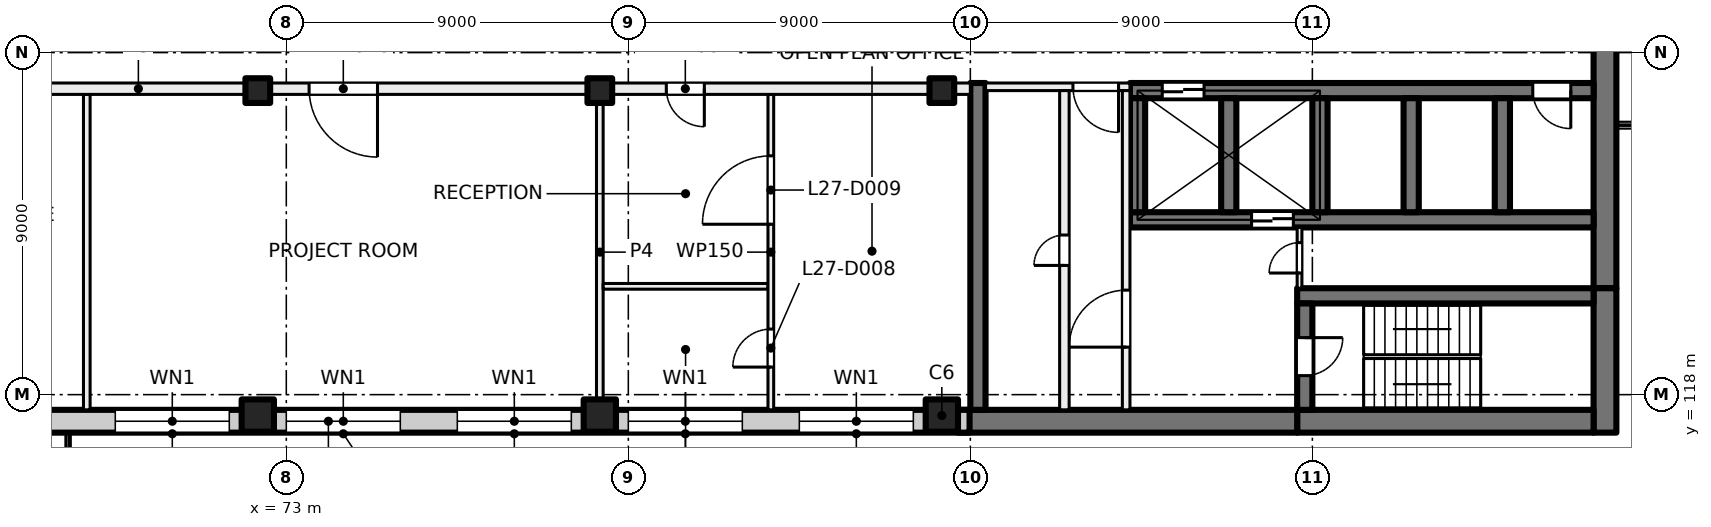
"""IFC4 building model, lengths in metres.
Left out: names, types, materials, properties, quantities, classifications, styles, units other than length and angle.
Written with IfcOpenShell. Run it as: python <this file> out.ifc"""

import sys

from ifc_helpers import new_model, si_unit, direction, frame, frame_2d, origin, origin_2d, place, context, subcontext, project, spatial, rectangle, extrude, element, fill, save


model = new_model("IFC4")
c1 = context("Model", 3, precision=1e-05, world=origin(), true_north=direction((0.0, 1.0)))
c2 = subcontext(c1, "Body", "Model", "MODEL_VIEW")
j1 = project(units=[si_unit("LENGTHUNIT", "METRE"), si_unit("PLANEANGLEUNIT", "RADIAN")], contexts=[c1])
p1 = place(None, origin())
s1 = spatial("IfcSite", under=j1, at=p1, CompositionType="ELEMENT")
p2 = place(p1, origin())
s2 = spatial("IfcBuilding", under=s1, at=p2, CompositionType="ELEMENT")
p3 = place(p2, frame((0.0, 0.0, 117.0)))
s3 = spatial("IfcBuildingStorey", under=s2, at=p3, CompositionType="ELEMENT", Elevation=117.0)
for number, where, z_axis, x_axis in (
    (1, (72.25, 126.0, 0.0), (0.0, 0.0, 1.0), (1.0, 0.0, 0.0)),
    (2, (81.25, 126.0, 0.0), (0.0, 0.0, 1.0), (1.0, 0.0, 0.0)),
    (3, (90.25, 126.0, 0.0), (0.0, 0.0, 1.0), (1.0, 0.0, 0.0)),
):
    element("IfcColumn", number, at=place(p3, frame(where, z_axis=z_axis, x_axis=x_axis)), inside=s3, PredefinedType="COLUMN", context=c2, shape_type="SweptSolid", body=[
        extrude(rectangle(XDim=0.65, YDim=0.65, at=origin_2d()), origin(), (0.0, 0.0, 1.0), 4.0),
    ])
for number, where, z_axis, x_axis in (
    (4, (72.25, 117.45, 0.0), (0.0, 0.0, 1.0), (1.0, 0.0, 0.0)),
    (5, (81.25, 117.45, 0.0), (0.0, 0.0, 1.0), (1.0, 0.0, 0.0)),
    (6, (90.25, 117.45, 0.0), (0.0, 0.0, 1.0), (1.0, 0.0, 0.0)),
):
    element("IfcColumn", number, at=place(p3, frame(where, z_axis=z_axis, x_axis=x_axis)), inside=s3, PredefinedType="COLUMN", context=c2, shape_type="SweptSolid", body=[
        extrude(rectangle(XDim=0.85, YDim=0.85, at=origin_2d()), origin(), (0.0, 0.0, 1.0), 4.0),
    ])
p4 = place(p3, frame((107.7, 135.2, 0.0), z_axis=(0.0, 0.0, 1.0), x_axis=(0.0, -1.0, 0.0)))
e7 = element("IfcWall", 7, at=p4, inside=s3, PredefinedType="SHEAR", context=c2, shape_type="SweptSolid", body=[
    extrude(rectangle(XDim=14.4, YDim=0.6, at=frame_2d((7.2, 0.0))), origin(), (0.0, 0.0, 1.0), 4.0),
])
p5 = place(p3, frame((107.7, 120.8, 0.0), z_axis=(0.0, 0.0, 1.0), x_axis=(0.0, -1.0, 0.0)))
e8 = element("IfcWall", 8, at=p5, inside=s3, PredefinedType="SHEAR", context=c2, shape_type="SweptSolid", body=[
    extrude(rectangle(XDim=3.8, YDim=0.6, at=frame_2d((1.9, 0.0))), origin(), (0.0, 0.0, 1.0), 4.0),
])
p6 = place(p3, frame((107.4, 117.3, 0.0), z_axis=(0.0, 0.0, 1.0), x_axis=(-1.0, 0.0, 0.0)))
e9 = element("IfcWall", 9, at=p6, inside=s3, PredefinedType="SHEAR", context=c2, shape_type="SweptSolid", body=[
    extrude(rectangle(XDim=7.8, YDim=0.6, at=frame_2d((3.9, 0.0))), origin(), (0.0, 0.0, 1.0), 4.0),
])
p7 = place(p3, frame((99.6, 117.3, 0.0), z_axis=(0.0, 0.0, 1.0), x_axis=(-1.0, 0.0, 0.0)))
e10 = element("IfcWall", 10, at=p7, inside=s3, PredefinedType="SHEAR", context=c2, shape_type="SweptSolid", body=[
    extrude(rectangle(XDim=8.925, YDim=0.6, at=frame_2d((4.462, 0.0))), origin(), (0.0, 0.0, 1.0), 4.0),
])
p8 = place(p3, frame((107.4, 120.6, 0.0), z_axis=(0.0, 0.0, 1.0), x_axis=(-1.0, 0.0, 0.0)))
e11 = element("IfcWall", 11, at=p8, inside=s3, PredefinedType="SHEAR", context=c2, shape_type="SweptSolid", body=[
    extrude(rectangle(XDim=7.8, YDim=0.4, at=frame_2d((3.9, 0.0))), origin(), (0.0, 0.0, 1.0), 4.0),
])
p9 = place(p3, frame((99.8, 120.4, 0.0), z_axis=(0.0, 0.0, 1.0), x_axis=(0.0, -1.0, 0.0)))
e12 = element("IfcWall", 12, at=p9, inside=s3, PredefinedType="SHEAR", context=c2, shape_type="SweptSolid", body=[
    extrude(rectangle(XDim=2.8, YDim=0.4, at=frame_2d((1.4, 0.0))), origin(), (0.0, 0.0, 1.0), 4.0),
])
p10 = place(p9, frame((0.9, 0.0, 0.0)))
e13 = element("IfcOpeningElement", 13, at=p10, cuts=e12, PredefinedType="OPENING", context=c2, shape_type="SweptSolid", body=[
    extrude(rectangle(XDim=1.0, YDim=2.1, at=frame_2d((0.5, 1.05))), frame((0.0, 0.21, 0.0), z_axis=(0.0, -1.0, 0.0), x_axis=(1.0, 0.0, 0.0)), (0.0, 0.0, 1.0), 0.42),
])
p11 = place(p3, frame((107.4, 126.0, 0.0), z_axis=(0.0, 0.0, 1.0), x_axis=(-1.0, 0.0, 0.0)))
e14 = element("IfcWall", 14, at=p11, inside=s3, PredefinedType="SHEAR", context=c2, shape_type="SweptSolid", body=[
    extrude(rectangle(XDim=12.2, YDim=0.4, at=frame_2d((6.1, 0.0))), origin(), (0.0, 0.0, 1.0), 4.0),
])
p12 = place(p11, frame((10.25, 0.0, 0.0)))
e15 = element("IfcOpeningElement", 15, at=p12, cuts=e14, PredefinedType="OPENING", context=c2, shape_type="SweptSolid", body=[
    extrude(rectangle(XDim=1.1, YDim=2.1, at=frame_2d((0.55, 1.05))), frame((0.0, 0.21, 0.0), z_axis=(0.0, -1.0, 0.0), x_axis=(1.0, 0.0, 0.0)), (0.0, 0.0, 1.0), 0.42),
])
p13 = place(p11, frame((0.6, 0.0, 0.0)))
e16 = element("IfcOpeningElement", 16, at=p13, cuts=e14, PredefinedType="OPENING", context=c2, shape_type="SweptSolid", body=[
    extrude(rectangle(XDim=1.0, YDim=2.1, at=frame_2d((0.5, 1.05))), frame((0.0, 0.21, 0.0), z_axis=(0.0, -1.0, 0.0), x_axis=(1.0, 0.0, 0.0)), (0.0, 0.0, 1.0), 0.42),
])
p14 = place(p3, frame((107.4, 122.6, 0.0), z_axis=(0.0, 0.0, 1.0), x_axis=(-1.0, 0.0, 0.0)))
e17 = element("IfcWall", 17, at=p14, inside=s3, PredefinedType="SHEAR", context=c2, shape_type="SweptSolid", body=[
    extrude(rectangle(XDim=12.2, YDim=0.4, at=frame_2d((6.1, 0.0))), origin(), (0.0, 0.0, 1.0), 4.0),
])
p15 = place(p14, frame((7.9, 0.0, 0.0)))
e18 = element("IfcOpeningElement", 18, at=p15, cuts=e17, PredefinedType="OPENING", context=c2, shape_type="SweptSolid", body=[
    extrude(rectangle(XDim=1.1, YDim=2.1, at=frame_2d((0.55, 1.05))), frame((0.0, 0.21, 0.0), z_axis=(0.0, -1.0, 0.0), x_axis=(1.0, 0.0, 0.0)), (0.0, 0.0, 1.0), 0.42),
])
for number, where, z_axis, x_axis in (
    (19, (105.0, 125.8, 0.0), (0.0, 0.0, 1.0), (0.0, -1.0, 0.0)),
    (20, (102.6, 125.8, 0.0), (0.0, 0.0, 1.0), (0.0, -1.0, 0.0)),
    (21, (100.2, 125.8, 0.0), (0.0, 0.0, 1.0), (0.0, -1.0, 0.0)),
    (22, (97.8, 125.8, 0.0), (0.0, 0.0, 1.0), (0.0, -1.0, 0.0)),
    (23, (95.4, 125.8, 0.0), (0.0, 0.0, 1.0), (0.0, -1.0, 0.0)),
):
    element("IfcWall", number, at=place(p3, frame(where, z_axis=z_axis, x_axis=x_axis)), inside=s3, PredefinedType="SHEAR", context=c2, shape_type="SweptSolid", body=[
        extrude(rectangle(XDim=3.0, YDim=0.4, at=frame_2d((1.5, 0.0))), origin(), (0.0, 0.0, 1.0), 4.0),
    ])
p16 = place(p3, frame((91.2, 126.2, 0.0), z_axis=(0.0, 0.0, 1.0), x_axis=(0.0, -1.0, 0.0)))
e24 = element("IfcWall", 24, at=p16, inside=s3, PredefinedType="SHEAR", context=c2, shape_type="SweptSolid", body=[
    extrude(rectangle(XDim=8.6, YDim=0.4, at=frame_2d((4.3, 0.0))), origin(), (0.0, 0.0, 1.0), 4.0),
])
p17 = place(p3, frame((90.98, 117.3, 0.0), z_axis=(0.0, 0.0, 1.0), x_axis=(-1.0, 0.0, 0.0)))
e25 = element("IfcWall", 25, at=p17, inside=s3, PredefinedType="SOLIDWALL", context=c2, shape_type="SweptSolid", body=[
    extrude(rectangle(XDim=33.745, YDim=0.6, at=frame_2d((16.873, 0.0))), origin(), (0.0, 0.0, 1.0), 3.625),
])
p18 = place(p17, frame((1.48, 0.0, 0.9)))
e26 = element("IfcOpeningElement", 26, at=p18, cuts=e25, PredefinedType="OPENING", context=c2, shape_type="SweptSolid", body=[
    extrude(rectangle(XDim=3.0, YDim=2.4, at=frame_2d((1.5, 1.2))), frame((0.0, 0.31, 0.0), z_axis=(0.0, -1.0, 0.0), x_axis=(1.0, 0.0, 0.0)), (0.0, 0.0, 1.0), 0.62),
])
p19 = place(p17, frame((5.98, 0.0, 0.9)))
e27 = element("IfcOpeningElement", 27, at=p19, cuts=e25, PredefinedType="OPENING", context=c2, shape_type="SweptSolid", body=[
    extrude(rectangle(XDim=3.0, YDim=2.4, at=frame_2d((1.5, 1.2))), frame((0.0, 0.31, 0.0), z_axis=(0.0, -1.0, 0.0), x_axis=(1.0, 0.0, 0.0)), (0.0, 0.0, 1.0), 0.62),
])
p20 = place(p17, frame((10.48, 0.0, 0.9)))
e28 = element("IfcOpeningElement", 28, at=p20, cuts=e25, PredefinedType="OPENING", context=c2, shape_type="SweptSolid", body=[
    extrude(rectangle(XDim=3.0, YDim=2.4, at=frame_2d((1.5, 1.2))), frame((0.0, 0.31, 0.0), z_axis=(0.0, -1.0, 0.0), x_axis=(1.0, 0.0, 0.0)), (0.0, 0.0, 1.0), 0.62),
])
p21 = place(p17, frame((14.98, 0.0, 0.9)))
e29 = element("IfcOpeningElement", 29, at=p21, cuts=e25, PredefinedType="OPENING", context=c2, shape_type="SweptSolid", body=[
    extrude(rectangle(XDim=3.0, YDim=2.4, at=frame_2d((1.5, 1.2))), frame((0.0, 0.31, 0.0), z_axis=(0.0, -1.0, 0.0), x_axis=(1.0, 0.0, 0.0)), (0.0, 0.0, 1.0), 0.62),
])
p22 = place(p17, frame((19.48, 0.0, 0.9)))
e30 = element("IfcOpeningElement", 30, at=p22, cuts=e25, PredefinedType="OPENING", context=c2, shape_type="SweptSolid", body=[
    extrude(rectangle(XDim=3.0, YDim=2.4, at=frame_2d((1.5, 1.2))), frame((0.0, 0.31, 0.0), z_axis=(0.0, -1.0, 0.0), x_axis=(1.0, 0.0, 0.0)), (0.0, 0.0, 1.0), 0.62),
])
p23 = place(p17, frame((24.58, 0.0, 0.0)))
e31 = element("IfcOpeningElement", 31, at=p23, cuts=e25, PredefinedType="OPENING", context=c2, shape_type="SweptSolid", body=[
    extrude(rectangle(XDim=1.8, YDim=2.4, at=frame_2d((0.9, 1.2))), frame((0.0, 0.31, 0.0), z_axis=(0.0, -1.0, 0.0), x_axis=(1.0, 0.0, 0.0)), (0.0, 0.0, 1.0), 0.62),
])
p24 = place(p17, frame((28.48, 0.0, 0.9)))
e32 = element("IfcOpeningElement", 32, at=p24, cuts=e25, PredefinedType="OPENING", context=c2, shape_type="SweptSolid", body=[
    extrude(rectangle(XDim=3.0, YDim=2.4, at=frame_2d((1.5, 1.2))), frame((0.0, 0.31, 0.0), z_axis=(0.0, -1.0, 0.0), x_axis=(1.0, 0.0, 0.0)), (0.0, 0.0, 1.0), 0.62),
])
p25 = place(p3, frame((95.2, 126.1, 0.0), z_axis=(0.0, 0.0, 1.0), x_axis=(-1.0, 0.0, 0.0)))
e33 = element("IfcWall", 33, at=p25, inside=s3, PredefinedType="PARTITIONING", context=c2, shape_type="SweptSolid", body=[
    extrude(rectangle(XDim=3.8, YDim=0.2, at=frame_2d((1.9, 0.0))), origin(), (0.0, 0.0, 1.0), 3.625),
])
p26 = place(p25, frame((0.3, 0.0, 0.0)))
e34 = element("IfcOpeningElement", 34, at=p26, cuts=e33, PredefinedType="OPENING", context=c2, shape_type="SweptSolid", body=[
    extrude(rectangle(XDim=1.2, YDim=2.1, at=frame_2d((0.6, 1.05))), frame((0.0, 0.11, 0.0), z_axis=(0.0, -1.0, 0.0), x_axis=(1.0, 0.0, 0.0)), (0.0, 0.0, 1.0), 0.22),
])
p27 = place(p3, frame((95.1, 117.6, 0.0), z_axis=(0.0, 0.0, 1.0), x_axis=(0.0, 1.0, 0.0)))
e35 = element("IfcWall", 35, at=p27, inside=s3, PredefinedType="PARTITIONING", context=c2, shape_type="SweptSolid", body=[
    extrude(rectangle(XDim=8.4, YDim=0.2, at=frame_2d((4.2, 0.0))), origin(), (0.0, 0.0, 1.0), 3.625),
])
p28 = place(p27, frame((1.65, 0.0, 0.0)))
e36 = element("IfcOpeningElement", 36, at=p28, cuts=e35, PredefinedType="OPENING", context=c2, shape_type="SweptSolid", body=[
    extrude(rectangle(XDim=1.5, YDim=2.1, at=frame_2d((0.75, 1.05))), frame((0.0, 0.11, 0.0), z_axis=(0.0, -1.0, 0.0), x_axis=(1.0, 0.0, 0.0)), (0.0, 0.0, 1.0), 0.22),
])
p29 = place(p3, frame((93.475, 117.6, 0.0), z_axis=(0.0, 0.0, 1.0), x_axis=(0.0, 1.0, 0.0)))
e37 = element("IfcWall", 37, at=p29, inside=s3, PredefinedType="PARTITIONING", context=c2, shape_type="SweptSolid", body=[
    extrude(rectangle(XDim=8.4, YDim=0.25, at=frame_2d((4.2, 0.0))), origin(), (0.0, 0.0, 1.0), 3.625),
])
p30 = place(p29, frame((3.8, 0.0, 0.0)))
e38 = element("IfcOpeningElement", 38, at=p30, cuts=e37, PredefinedType="OPENING", context=c2, shape_type="SweptSolid", body=[
    extrude(rectangle(XDim=0.8, YDim=2.1, at=frame_2d((0.4, 1.05))), frame((0.0, 0.135, 0.0), z_axis=(0.0, -1.0, 0.0), x_axis=(1.0, 0.0, 0.0)), (0.0, 0.0, 1.0), 0.27),
])
p31 = place(p3, frame((99.663, 120.8, 0.0), z_axis=(0.0, 0.0, 1.0), x_axis=(0.0, 1.0, 0.0)))
e39 = element("IfcWall", 39, at=p31, inside=s3, PredefinedType="PARTITIONING", context=c2, shape_type="SweptSolid", body=[
    extrude(rectangle(XDim=1.6, YDim=0.125, at=frame_2d((0.8, 0.0))), origin(), (0.0, 0.0, 1.0), 3.625),
])
p32 = place(p31, frame((0.4, 0.0, 0.0)))
e40 = element("IfcOpeningElement", 40, at=p32, cuts=e39, PredefinedType="OPENING", context=c2, shape_type="SweptSolid", body=[
    extrude(rectangle(XDim=0.8, YDim=2.1, at=frame_2d((0.4, 1.05))), frame((0.0, 0.073, 0.0), z_axis=(0.0, -1.0, 0.0), x_axis=(1.0, 0.0, 0.0)), (0.0, 0.0, 1.0), 0.145),
])
for number, where, z_axis, x_axis in (
    (41, (67.75, 117.6, 0.0), (0.0, 0.0, 1.0), (0.0, 1.0, 0.0)),
    (42, (81.25, 117.6, 0.0), (0.0, 0.0, 1.0), (0.0, 1.0, 0.0)),
):
    element("IfcWall", number, at=place(p3, frame(where, z_axis=z_axis, x_axis=x_axis)), inside=s3, PredefinedType="PARTITIONING", context=c2, shape_type="SweptSolid", body=[
        extrude(rectangle(XDim=8.3, YDim=0.175, at=frame_2d((4.15, 0.0))), origin(), (0.0, 0.0, 1.0), 3.625),
    ])
p33 = place(p3, frame((81.338, 120.85, 0.0), z_axis=(0.0, 0.0, 1.0), x_axis=(1.0, 0.0, 0.0)))
e43 = element("IfcWall", 43, at=p33, inside=s3, PredefinedType="PARTITIONING", context=c2, shape_type="SweptSolid", body=[
    extrude(rectangle(XDim=4.337, YDim=0.15, at=frame_2d((2.168, 0.0))), origin(), (0.0, 0.0, 1.0), 3.625),
])
p34 = place(p3, frame((85.75, 117.6, 0.0), z_axis=(0.0, 0.0, 1.0), x_axis=(0.0, 1.0, 0.0)))
e44 = element("IfcWall", 44, at=p34, inside=s3, PredefinedType="PARTITIONING", context=c2, shape_type="SweptSolid", body=[
    extrude(rectangle(XDim=8.3, YDim=0.15, at=frame_2d((4.15, 0.0))), origin(), (0.0, 0.0, 1.0), 3.625),
])
p35 = place(p34, frame((1.125, 0.0, 0.0)))
e45 = element("IfcOpeningElement", 45, at=p35, cuts=e44, PredefinedType="OPENING", context=c2, shape_type="SweptSolid", body=[
    extrude(rectangle(XDim=1.0, YDim=2.1, at=frame_2d((0.5, 1.05))), frame((0.0, 0.085, 0.0), z_axis=(0.0, -1.0, 0.0), x_axis=(1.0, 0.0, 0.0)), (0.0, 0.0, 1.0), 0.17),
])
p36 = place(p34, frame((4.884, 0.0, 0.0)))
e46 = element("IfcOpeningElement", 46, at=p36, cuts=e44, PredefinedType="OPENING", context=c2, shape_type="SweptSolid", body=[
    extrude(rectangle(XDim=1.8, YDim=2.1, at=frame_2d((0.9, 1.05))), frame((0.0, 0.085, 0.0), z_axis=(0.0, -1.0, 0.0), x_axis=(1.0, 0.0, 0.0)), (0.0, 0.0, 1.0), 0.17),
])
p37 = place(p3, frame((91.0, 126.05, 0.0), z_axis=(0.0, 0.0, 1.0), x_axis=(-1.0, 0.0, 0.0)))
e47 = element("IfcWall", 47, at=p37, inside=s3, PredefinedType="PARTITIONING", context=c2, shape_type="SweptSolid", body=[
    extrude(rectangle(XDim=43.785, YDim=0.3, at=frame_2d((21.893, 0.0))), origin(), (0.0, 0.0, 1.0), 3.625),
])
p38 = place(p37, frame((7.0, 0.0, 0.0)))
e48 = element("IfcOpeningElement", 48, at=p38, cuts=e47, PredefinedType="OPENING", context=c2, shape_type="SweptSolid", body=[
    extrude(rectangle(XDim=1.0, YDim=2.1, at=frame_2d((0.5, 1.05))), frame((0.0, 0.16, 0.0), z_axis=(0.0, -1.0, 0.0), x_axis=(1.0, 0.0, 0.0)), (0.0, 0.0, 1.0), 0.32),
])
p39 = place(p37, frame((15.6, 0.0, 0.0)))
e49 = element("IfcOpeningElement", 49, at=p39, cuts=e47, PredefinedType="OPENING", context=c2, shape_type="SweptSolid", body=[
    extrude(rectangle(XDim=1.8, YDim=2.1, at=frame_2d((0.9, 1.05))), frame((0.0, 0.16, 0.0), z_axis=(0.0, -1.0, 0.0), x_axis=(1.0, 0.0, 0.0)), (0.0, 0.0, 1.0), 0.32),
])
p40 = place(p37, frame((34.0, 0.0, 0.0)))
e50 = element("IfcOpeningElement", 50, at=p40, cuts=e47, PredefinedType="OPENING", context=c2, shape_type="SweptSolid", body=[
    extrude(rectangle(XDim=1.0, YDim=2.1, at=frame_2d((0.5, 1.05))), frame((0.0, 0.16, 0.0), z_axis=(0.0, -1.0, 0.0), x_axis=(1.0, 0.0, 0.0)), (0.0, 0.0, 1.0), 0.32),
])
p41 = place(p37, frame((39.296, 0.0, 0.0)))
e51 = element("IfcOpeningElement", 51, at=p41, cuts=e47, PredefinedType="OPENING", context=c2, shape_type="SweptSolid", body=[
    extrude(rectangle(XDim=1.8, YDim=2.1, at=frame_2d((0.9, 1.05))), frame((0.0, 0.16, 0.0), z_axis=(0.0, -1.0, 0.0), x_axis=(1.0, 0.0, 0.0)), (0.0, 0.0, 1.0), 0.32),
])
p42 = place(p18, origin())
e52 = element("IfcWindow", 52, at=p42, inside=s3, PartitioningType="SINGLE_PANEL", PredefinedType="WINDOW", context=c2, shape_type="SweptSolid", body=[
    extrude(rectangle(XDim=3.0, YDim=2.4, at=frame_2d((1.5, 1.2))), frame((0.0, 0.03, 0.0), z_axis=(0.0, -1.0, 0.0), x_axis=(1.0, 0.0, 0.0)), (0.0, 0.0, 1.0), 0.06),
])
fill(e26, e52)
p43 = place(p19, origin())
e53 = element("IfcWindow", 53, at=p43, inside=s3, PartitioningType="SINGLE_PANEL", PredefinedType="WINDOW", context=c2, shape_type="SweptSolid", body=[
    extrude(rectangle(XDim=3.0, YDim=2.4, at=frame_2d((1.5, 1.2))), frame((0.0, 0.03, 0.0), z_axis=(0.0, -1.0, 0.0), x_axis=(1.0, 0.0, 0.0)), (0.0, 0.0, 1.0), 0.06),
])
fill(e27, e53)
p44 = place(p20, origin())
e54 = element("IfcWindow", 54, at=p44, inside=s3, PartitioningType="SINGLE_PANEL", PredefinedType="WINDOW", context=c2, shape_type="SweptSolid", body=[
    extrude(rectangle(XDim=3.0, YDim=2.4, at=frame_2d((1.5, 1.2))), frame((0.0, 0.03, 0.0), z_axis=(0.0, -1.0, 0.0), x_axis=(1.0, 0.0, 0.0)), (0.0, 0.0, 1.0), 0.06),
])
fill(e28, e54)
p45 = place(p21, origin())
e55 = element("IfcWindow", 55, at=p45, inside=s3, PartitioningType="SINGLE_PANEL", PredefinedType="WINDOW", context=c2, shape_type="SweptSolid", body=[
    extrude(rectangle(XDim=3.0, YDim=2.4, at=frame_2d((1.5, 1.2))), frame((0.0, 0.03, 0.0), z_axis=(0.0, -1.0, 0.0), x_axis=(1.0, 0.0, 0.0)), (0.0, 0.0, 1.0), 0.06),
])
fill(e29, e55)
p46 = place(p22, origin())
e56 = element("IfcWindow", 56, at=p46, inside=s3, PartitioningType="SINGLE_PANEL", PredefinedType="WINDOW", context=c2, shape_type="SweptSolid", body=[
    extrude(rectangle(XDim=3.0, YDim=2.4, at=frame_2d((1.5, 1.2))), frame((0.0, 0.03, 0.0), z_axis=(0.0, -1.0, 0.0), x_axis=(1.0, 0.0, 0.0)), (0.0, 0.0, 1.0), 0.06),
])
fill(e30, e56)
p47 = place(p12, origin())
e57 = element("IfcDoor", 57, at=p47, inside=s3, OperationType="DOUBLE_DOOR_SLIDING", PredefinedType="DOOR", context=c2, shape_type="SweptSolid", body=[
    extrude(rectangle(XDim=1.1, YDim=2.1, at=frame_2d((0.55, 1.05))), frame((0.0, 0.025, 0.0), z_axis=(0.0, -1.0, 0.0), x_axis=(1.0, 0.0, 0.0)), (0.0, 0.0, 1.0), 0.05),
])
fill(e15, e57)
p48 = place(p13, origin())
e58 = element("IfcDoor", 58, at=p48, inside=s3, OperationType="SINGLE_SWING_LEFT", PredefinedType="DOOR", context=c2, shape_type="SweptSolid", body=[
    extrude(rectangle(XDim=1.0, YDim=2.1, at=frame_2d((0.5, 1.05))), frame((0.0, 0.025, 0.0), z_axis=(0.0, -1.0, 0.0), x_axis=(1.0, 0.0, 0.0)), (0.0, 0.0, 1.0), 0.05),
])
fill(e16, e58)
p49 = place(p26, origin())
e59 = element("IfcDoor", 59, at=p49, inside=s3, OperationType="DOUBLE_DOOR_SINGLE_SWING", PredefinedType="DOOR", context=c2, shape_type="SweptSolid", body=[
    extrude(rectangle(XDim=1.2, YDim=2.1, at=frame_2d((0.6, 1.05))), frame((0.0, 0.025, 0.0), z_axis=(0.0, -1.0, 0.0), x_axis=(1.0, 0.0, 0.0)), (0.0, 0.0, 1.0), 0.05),
])
fill(e34, e59)
p50 = place(p28, origin())
e60 = element("IfcDoor", 60, at=p50, inside=s3, OperationType="DOUBLE_DOOR_SINGLE_SWING", PredefinedType="DOOR", context=c2, shape_type="SweptSolid", body=[
    extrude(rectangle(XDim=1.5, YDim=2.1, at=frame_2d((0.75, 1.05))), frame((0.0, 0.025, 0.0), z_axis=(0.0, -1.0, 0.0), x_axis=(1.0, 0.0, 0.0)), (0.0, 0.0, 1.0), 0.05),
])
fill(e36, e60)
p51 = place(p10, origin())
e61 = element("IfcDoor", 61, at=p51, inside=s3, OperationType="SINGLE_SWING_LEFT", PredefinedType="DOOR", context=c2, shape_type="SweptSolid", body=[
    extrude(rectangle(XDim=1.0, YDim=2.1, at=frame_2d((0.5, 1.05))), frame((0.0, 0.025, 0.0), z_axis=(0.0, -1.0, 0.0), x_axis=(1.0, 0.0, 0.0)), (0.0, 0.0, 1.0), 0.05),
])
fill(e13, e61)
p52 = place(p32, origin())
e62 = element("IfcDoor", 62, at=p52, inside=s3, OperationType="SINGLE_SWING_RIGHT", PredefinedType="DOOR", context=c2, shape_type="SweptSolid", body=[
    extrude(rectangle(XDim=0.8, YDim=2.1, at=frame_2d((0.4, 1.05))), frame((0.0, 0.025, 0.0), z_axis=(0.0, -1.0, 0.0), x_axis=(1.0, 0.0, 0.0)), (0.0, 0.0, 1.0), 0.05),
])
fill(e40, e62)
p53 = place(p30, origin())
e63 = element("IfcDoor", 63, at=p53, inside=s3, OperationType="SINGLE_SWING_LEFT", PredefinedType="DOOR", context=c2, shape_type="SweptSolid", body=[
    extrude(rectangle(XDim=0.8, YDim=2.1, at=frame_2d((0.4, 1.05))), frame((0.0, 0.025, 0.0), z_axis=(0.0, -1.0, 0.0), x_axis=(1.0, 0.0, 0.0)), (0.0, 0.0, 1.0), 0.05),
])
fill(e38, e63)
p54 = place(p15, origin())
e64 = element("IfcDoor", 64, at=p54, inside=s3, OperationType="DOUBLE_DOOR_SLIDING", PredefinedType="DOOR", context=c2, shape_type="SweptSolid", body=[
    extrude(rectangle(XDim=1.1, YDim=2.1, at=frame_2d((0.55, 1.05))), frame((0.0, 0.025, 0.0), z_axis=(0.0, -1.0, 0.0), x_axis=(1.0, 0.0, 0.0)), (0.0, 0.0, 1.0), 0.05),
])
fill(e18, e64)
p55 = place(p38, origin())
e65 = element("IfcDoor", 65, at=p55, inside=s3, OperationType="SINGLE_SWING_RIGHT", PredefinedType="DOOR", context=c2, shape_type="SweptSolid", body=[
    extrude(rectangle(XDim=1.0, YDim=2.1, at=frame_2d((0.5, 1.05))), frame((0.0, 0.025, 0.0), z_axis=(0.0, -1.0, 0.0), x_axis=(1.0, 0.0, 0.0)), (0.0, 0.0, 1.0), 0.05),
])
fill(e48, e65)
p56 = place(p35, origin())
e66 = element("IfcDoor", 66, at=p56, inside=s3, OperationType="SINGLE_SWING_RIGHT", PredefinedType="DOOR", context=c2, shape_type="SweptSolid", body=[
    extrude(rectangle(XDim=1.0, YDim=2.1, at=frame_2d((0.5, 1.05))), frame((0.0, 0.025, 0.0), z_axis=(0.0, -1.0, 0.0), x_axis=(1.0, 0.0, 0.0)), (0.0, 0.0, 1.0), 0.05),
])
fill(e45, e66)
p57 = place(p36, origin())
e67 = element("IfcDoor", 67, at=p57, inside=s3, OperationType="DOUBLE_DOOR_SINGLE_SWING", PredefinedType="DOOR", context=c2, shape_type="SweptSolid", body=[
    extrude(rectangle(XDim=1.8, YDim=2.1, at=frame_2d((0.9, 1.05))), frame((0.0, 0.025, 0.0), z_axis=(0.0, -1.0, 0.0), x_axis=(1.0, 0.0, 0.0)), (0.0, 0.0, 1.0), 0.05),
])
fill(e46, e67)
p58 = place(p39, origin())
e68 = element("IfcDoor", 68, at=p58, inside=s3, OperationType="DOUBLE_DOOR_SINGLE_SWING", PredefinedType="DOOR", context=c2, shape_type="SweptSolid", body=[
    extrude(rectangle(XDim=1.8, YDim=2.1, at=frame_2d((0.9, 1.05))), frame((0.0, 0.025, 0.0), z_axis=(0.0, -1.0, 0.0), x_axis=(1.0, 0.0, 0.0)), (0.0, 0.0, 1.0), 0.05),
])
fill(e49, e68)
save(model, sys.argv[1])
